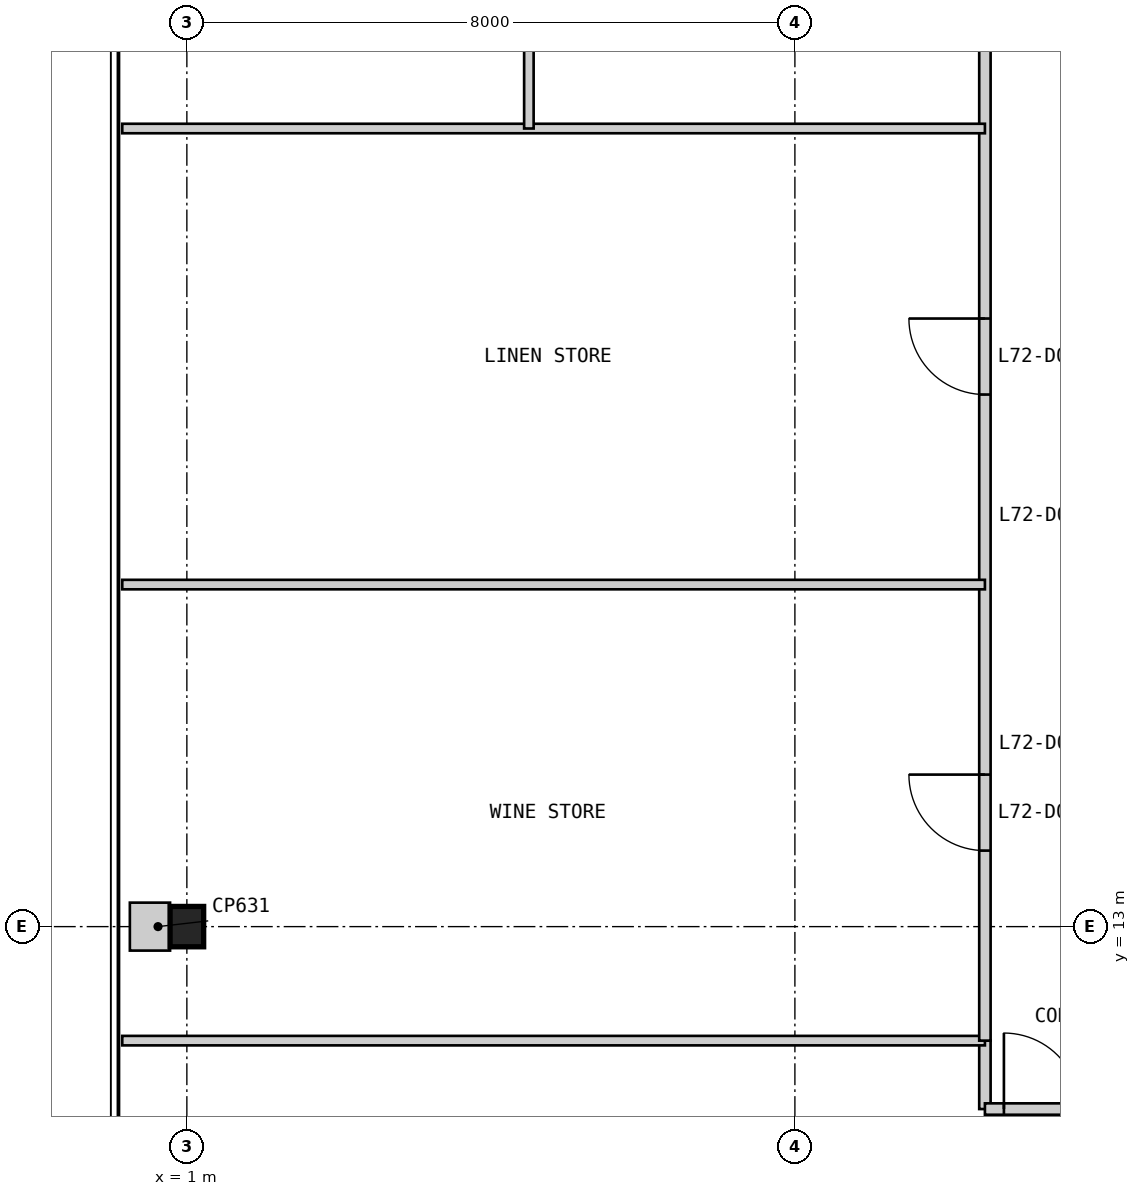
"""IFC4 building model, lengths in metres.
Left out: names, types, materials, properties, quantities, classifications, styles, units other than length and angle.
Written with IfcOpenShell. Run it as: python <this file> out.ifc"""

import sys

from ifc_helpers import new_model, si_unit, direction, frame, frame_2d, origin, origin_2d, place, context, subcontext, project, spatial, rectangle, i_section, extrude, element, fill, save


model = new_model("IFC4")
c1 = context("Model", 3, precision=1e-05, world=origin(), true_north=direction((0.0, 1.0)))
c2 = subcontext(c1, "Body", "Model", "MODEL_VIEW")
j1 = project(units=[si_unit("LENGTHUNIT", "METRE"), si_unit("PLANEANGLEUNIT", "RADIAN")], contexts=[c1])
p1 = place(None, origin())
s1 = spatial("IfcSite", under=j1, at=p1, CompositionType="ELEMENT")
p2 = place(p1, origin())
s2 = spatial("IfcBuilding", under=s1, at=p2, CompositionType="ELEMENT")
p3 = place(p2, frame((0.0, 0.0, 296.8)))
s3 = spatial("IfcBuildingStorey", under=s2, at=p3, CompositionType="ELEMENT", Elevation=296.8)
p4 = place(p3, frame((1.0, 13.0, 0.0), z_axis=(0.0, 0.0, 1.0), x_axis=(1.0, 0.0, 0.0)))
e1 = element("IfcColumn", 1, at=p4, inside=s3, PredefinedType="COLUMN", context=c2, shape_type="SweptSolid", body=[
    extrude(i_section(OverallWidth=0.442, OverallDepth=0.531, WebThickness=0.066, FlangeThickness=0.106, at=origin_2d()), origin(), (0.0, 0.0, 1.0), 5.0),
])
p5 = place(p3, frame((11.5, 11.5, 0.0), z_axis=(0.0, 0.0, 1.0), x_axis=(0.0, -1.0, 0.0)))
e2 = element("IfcWall", 2, at=p5, inside=s3, PredefinedType="PARTITIONING", context=c2, shape_type="SweptSolid", body=[
    extrude(rectangle(XDim=0.9, YDim=0.15, at=frame_2d((0.45, 0.0))), origin(), (0.0, 0.0, 1.0), 4.8),
])
p6 = place(p3, frame((11.5, 10.6, 0.0), z_axis=(0.0, 0.0, 1.0), x_axis=(1.0, 0.0, 0.0)))
e3 = element("IfcWall", 3, at=p6, inside=s3, PredefinedType="PARTITIONING", context=c2, shape_type="SweptSolid", body=[
    extrude(rectangle(XDim=27.0, YDim=0.15, at=frame_2d((13.5, 0.0))), origin(), (0.0, 0.0, 1.0), 4.8),
])
p7 = place(p6, frame((0.25, 0.0, 0.0)))
e4 = element("IfcOpeningElement", 4, at=p7, cuts=e3, PredefinedType="OPENING", context=c2, shape_type="SweptSolid", body=[
    extrude(rectangle(XDim=1.0, YDim=2.2, at=frame_2d((0.5, 1.1))), frame((0.0, 0.085, 0.0), z_axis=(0.0, -1.0, 0.0), x_axis=(1.0, 0.0, 0.0)), (0.0, 0.0, 1.0), 0.17),
])
p8 = place(p6, frame((10.75, 0.0, 0.0)))
e5 = element("IfcOpeningElement", 5, at=p8, cuts=e3, PredefinedType="OPENING", context=c2, shape_type="SweptSolid", body=[
    extrude(rectangle(XDim=1.0, YDim=2.2, at=frame_2d((0.5, 1.1))), frame((0.0, 0.085, 0.0), z_axis=(0.0, -1.0, 0.0), x_axis=(1.0, 0.0, 0.0)), (0.0, 0.0, 1.0), 0.17),
])
p9 = place(p6, frame((14.5, 0.0, 0.0)))
e6 = element("IfcOpeningElement", 6, at=p9, cuts=e3, PredefinedType="OPENING", context=c2, shape_type="SweptSolid", body=[
    extrude(rectangle(XDim=1.0, YDim=2.2, at=frame_2d((0.5, 1.1))), frame((0.0, 0.085, 0.0), z_axis=(0.0, -1.0, 0.0), x_axis=(1.0, 0.0, 0.0)), (0.0, 0.0, 1.0), 0.17),
])
p10 = place(p6, frame((23.5, 0.0, 0.0)))
e7 = element("IfcOpeningElement", 7, at=p10, cuts=e3, PredefinedType="OPENING", context=c2, shape_type="SweptSolid", body=[
    extrude(rectangle(XDim=1.0, YDim=2.2, at=frame_2d((0.5, 1.1))), frame((0.0, 0.085, 0.0), z_axis=(0.0, -1.0, 0.0), x_axis=(1.0, 0.0, 0.0)), (0.0, 0.0, 1.0), 0.17),
])
p11 = place(p3, frame((0.15, 11.5, 0.0), z_axis=(0.0, 0.0, 1.0), x_axis=(1.0, 0.0, 0.0)))
e8 = element("IfcWall", 8, at=p11, inside=s3, PredefinedType="PARTITIONING", context=c2, shape_type="SweptSolid", body=[
    extrude(rectangle(XDim=11.35, YDim=0.125, at=frame_2d((5.675, 0.0))), origin(), (0.0, 0.0, 1.0), 4.8),
])
p12 = place(p3, frame((11.5, 38.5, 0.0), z_axis=(0.0, 0.0, 1.0), x_axis=(0.0, -1.0, 0.0)))
e9 = element("IfcWall", 9, at=p12, inside=s3, PredefinedType="PARTITIONING", context=c2, shape_type="SweptSolid", body=[
    extrude(rectangle(XDim=27.0, YDim=0.15, at=frame_2d((13.5, 0.0))), origin(), (0.0, 0.0, 1.0), 4.8),
])
p13 = place(p12, frame((5.5, 0.0, 0.0)))
e10 = element("IfcOpeningElement", 10, at=p13, cuts=e9, PredefinedType="OPENING", context=c2, shape_type="SweptSolid", body=[
    extrude(rectangle(XDim=1.0, YDim=2.2, at=frame_2d((0.5, 1.1))), frame((0.0, 0.085, 0.0), z_axis=(0.0, -1.0, 0.0), x_axis=(1.0, 0.0, 0.0)), (0.0, 0.0, 1.0), 0.17),
])
p14 = place(p12, frame((17.5, 0.0, 0.0)))
e11 = element("IfcOpeningElement", 11, at=p14, cuts=e9, PredefinedType="OPENING", context=c2, shape_type="SweptSolid", body=[
    extrude(rectangle(XDim=1.0, YDim=2.2, at=frame_2d((0.5, 1.1))), frame((0.0, 0.085, 0.0), z_axis=(0.0, -1.0, 0.0), x_axis=(1.0, 0.0, 0.0)), (0.0, 0.0, 1.0), 0.17),
])
p15 = place(p12, frame((23.5, 0.0, 0.0)))
e12 = element("IfcOpeningElement", 12, at=p15, cuts=e9, PredefinedType="OPENING", context=c2, shape_type="SweptSolid", body=[
    extrude(rectangle(XDim=1.0, YDim=2.2, at=frame_2d((0.5, 1.1))), frame((0.0, 0.085, 0.0), z_axis=(0.0, -1.0, 0.0), x_axis=(1.0, 0.0, 0.0)), (0.0, 0.0, 1.0), 0.17),
])
for number, where, z_axis, x_axis in (
    (13, (0.15, 23.5, 0.0), (0.0, 0.0, 1.0), (1.0, 0.0, 0.0)),
    (14, (0.15, 17.5, 0.0), (0.0, 0.0, 1.0), (1.0, 0.0, 0.0)),
):
    element("IfcWall", number, at=place(p3, frame(where, z_axis=z_axis, x_axis=x_axis)), inside=s3, PredefinedType="PARTITIONING", context=c2, shape_type="SweptSolid", body=[
        extrude(rectangle(XDim=11.35, YDim=0.125, at=frame_2d((5.675, 0.0))), origin(), (0.0, 0.0, 1.0), 4.8),
    ])
p16 = place(p3, frame((5.5, 26.5, 0.0), z_axis=(0.0, 0.0, 1.0), x_axis=(0.0, -1.0, 0.0)))
e15 = element("IfcWall", 15, at=p16, inside=s3, PredefinedType="PARTITIONING", context=c2, shape_type="SweptSolid", body=[
    extrude(rectangle(XDim=3.0, YDim=0.125, at=frame_2d((1.5, 0.0))), origin(), (0.0, 0.0, 1.0), 4.8),
])
p17 = place(p3, frame((0.25, 13.0, 0.0), z_axis=(0.0, 0.0, 1.0), x_axis=(1.0, 0.0, 0.0)))
e16 = element("IfcWall", 16, at=p17, inside=s3, PredefinedType="PARTITIONING", context=c2, shape_type="SweptSolid", body=[
    extrude(rectangle(XDim=0.529, YDim=0.631, at=frame_2d((0.265, 0.0))), origin(), (0.0, 0.0, 1.0), 4.8),
])
p18 = place(p7, origin())
e17 = element("IfcDoor", 17, at=p18, inside=s3, OperationType="SINGLE_SWING_LEFT", PredefinedType="DOOR", context=c2, shape_type="SweptSolid", body=[
    extrude(rectangle(XDim=1.0, YDim=2.2, at=frame_2d((0.5, 1.1))), frame((0.0, 0.025, 0.0), z_axis=(0.0, -1.0, 0.0), x_axis=(1.0, 0.0, 0.0)), (0.0, 0.0, 1.0), 0.05),
])
fill(e4, e17)
p19 = place(p14, frame((1.0, 0.0, 0.0), z_axis=(0.0, 0.0, 1.0), x_axis=(-1.0, 0.0, 0.0)))
e18 = element("IfcDoor", 18, at=p19, inside=s3, OperationType="SINGLE_SWING_RIGHT", PredefinedType="DOOR", context=c2, shape_type="SweptSolid", body=[
    extrude(rectangle(XDim=1.0, YDim=2.2, at=frame_2d((0.5, 1.1))), frame((0.0, 0.025, 0.0), z_axis=(0.0, -1.0, 0.0), x_axis=(1.0, 0.0, 0.0)), (0.0, 0.0, 1.0), 0.05),
])
fill(e11, e18)
p20 = place(p15, frame((1.0, 0.0, 0.0), z_axis=(0.0, 0.0, 1.0), x_axis=(-1.0, 0.0, 0.0)))
e19 = element("IfcDoor", 19, at=p20, inside=s3, OperationType="SINGLE_SWING_RIGHT", PredefinedType="DOOR", context=c2, shape_type="SweptSolid", body=[
    extrude(rectangle(XDim=1.0, YDim=2.2, at=frame_2d((0.5, 1.1))), frame((0.0, 0.025, 0.0), z_axis=(0.0, -1.0, 0.0), x_axis=(1.0, 0.0, 0.0)), (0.0, 0.0, 1.0), 0.05),
])
fill(e12, e19)
save(model, sys.argv[1])
